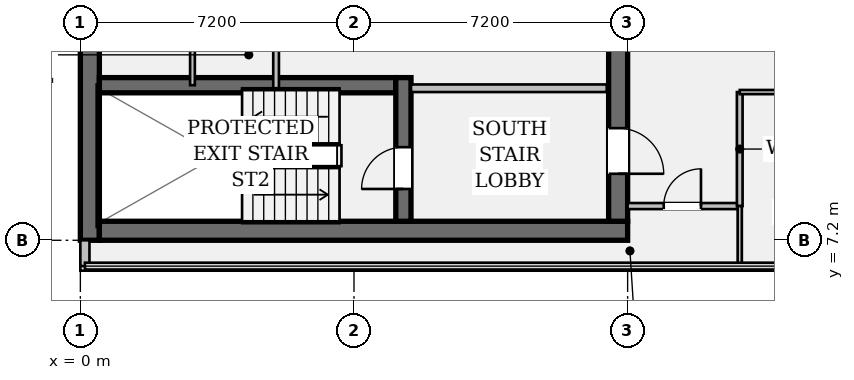
"""IFC4 building model, lengths in metres.
Left out: names, types, materials, properties, quantities, classifications, styles, units other than length and angle.
Written with IfcOpenShell. Run it as: python <this file> out.ifc"""

import sys

from ifc_helpers import new_model, si_unit, direction, frame, frame_2d, origin, place, context, subcontext, project, spatial, rectangle, extrude, element, fill, save


model = new_model("IFC4")
c1 = context("Model", 3, precision=1e-05, world=origin(), true_north=direction((0.0, 1.0)))
c2 = subcontext(c1, "Body", "Model", "MODEL_VIEW")
j1 = project(units=[si_unit("LENGTHUNIT", "METRE"), si_unit("PLANEANGLEUNIT", "RADIAN")], contexts=[c1])
p1 = place(None, origin())
s1 = spatial("IfcSite", under=j1, at=p1, CompositionType="ELEMENT")
p2 = place(p1, origin())
s2 = spatial("IfcBuilding", under=s1, at=p2, CompositionType="ELEMENT")
p3 = place(p2, frame((0.0, 0.0, 276.15)))
s3 = spatial("IfcBuildingStorey", under=s2, at=p3, CompositionType="ELEMENT", Elevation=276.15)
p4 = place(p3, frame((0.25, 7.2, 0.0), z_axis=(0.0, 0.0, 1.0), x_axis=(0.0, 1.0, 0.0)))
e1 = element("IfcWall", 1, at=p4, inside=s3, PredefinedType="SHEAR", context=c2, shape_type="SweptSolid", body=[
    extrude(rectangle(XDim=28.8, YDim=0.5, at=frame_2d((14.4, 0.0))), origin(), (0.0, 0.0, 1.0), 3.24),
])
p5 = place(p3, frame((0.5, 7.45, 0.0), z_axis=(0.0, 0.0, 1.0), x_axis=(1.0, 0.0, 0.0)))
e2 = element("IfcWall", 2, at=p5, inside=s3, PredefinedType="SHEAR", context=c2, shape_type="SweptSolid", body=[
    extrude(rectangle(XDim=13.9, YDim=0.5, at=frame_2d((6.95, 0.0))), origin(), (0.0, 0.0, 1.0), 3.24),
])
p6 = place(p3, frame((14.15, 35.5, 0.0), z_axis=(0.0, 0.0, 1.0), x_axis=(0.0, -1.0, 0.0)))
e3 = element("IfcWall", 3, at=p6, inside=s3, PredefinedType="SHEAR", context=c2, shape_type="SweptSolid", body=[
    extrude(rectangle(XDim=27.8, YDim=0.5, at=frame_2d((13.9, 0.0))), origin(), (0.0, 0.0, 1.0), 3.24),
])
p7 = place(p6, frame((1.4, 0.0, 0.0)))
e4 = element("IfcOpeningElement", 4, at=p7, cuts=e3, PredefinedType="OPENING", context=c2, shape_type="SweptSolid", body=[
    extrude(rectangle(XDim=1.2, YDim=2.15, at=frame_2d((0.6, 1.075))), frame((0.0, 0.262, 0.0), z_axis=(0.0, -1.0, 0.0), x_axis=(1.0, 0.0, 0.0)), (0.0, 0.0, 1.0), 0.524),
])
p8 = place(p6, frame((25.35, 0.0, 0.0)))
e5 = element("IfcOpeningElement", 5, at=p8, cuts=e3, PredefinedType="OPENING", context=c2, shape_type="SweptSolid", body=[
    extrude(rectangle(XDim=1.2, YDim=2.15, at=frame_2d((0.6, 1.075))), frame((0.0, 0.262, 0.0), z_axis=(0.0, -1.0, 0.0), x_axis=(1.0, 0.0, 0.0)), (0.0, 0.0, 1.0), 0.524),
])
p9 = place(p6, frame((14.7, 0.0, 0.0)))
e6 = element("IfcOpeningElement", 6, at=p9, cuts=e3, PredefinedType="OPENING", context=c2, shape_type="SweptSolid", body=[
    extrude(rectangle(XDim=1.6, YDim=2.2, at=frame_2d((0.8, 1.1))), frame((0.0, 0.262, 0.0), z_axis=(0.0, -1.0, 0.0), x_axis=(1.0, 0.0, 0.0)), (0.0, 0.0, 1.0), 0.524),
])
p10 = place(p3, frame((0.5, 11.28, 0.0), z_axis=(0.0, 0.0, 1.0), x_axis=(1.0, 0.0, 0.0)))
e7 = element("IfcWall", 7, at=p10, inside=s3, PredefinedType="SHEAR", context=c2, shape_type="SweptSolid", body=[
    extrude(rectangle(XDim=7.8, YDim=0.4, at=frame_2d((3.9, 0.0))), origin(), (0.0, 0.0, 1.0), 3.24),
])
p11 = place(p3, frame((8.5, 7.7, 0.0), z_axis=(0.0, 0.0, 1.0), x_axis=(0.0, 1.0, 0.0)))
e8 = element("IfcWall", 8, at=p11, inside=s3, PredefinedType="SHEAR", context=c2, shape_type="SweptSolid", body=[
    extrude(rectangle(XDim=3.78, YDim=0.4, at=frame_2d((1.89, 0.0))), origin(), (0.0, 0.0, 1.0), 3.24),
])
p12 = place(p11, frame((0.85, 0.0, 0.0)))
e9 = element("IfcOpeningElement", 9, at=p12, cuts=e8, PredefinedType="OPENING", context=c2, shape_type="SweptSolid", body=[
    extrude(rectangle(XDim=1.1, YDim=2.15, at=frame_2d((0.55, 1.075))), frame((0.0, 0.212, 0.0), z_axis=(0.0, -1.0, 0.0), x_axis=(1.0, 0.0, 0.0)), (0.0, 0.0, 1.0), 0.424),
])
p13 = place(p3, frame((0.12, 6.52, 0.0), z_axis=(0.0, 0.0, 1.0), x_axis=(0.0, 1.0, 0.0)))
e10 = element("IfcWall", 10, at=p13, inside=s3, PredefinedType="STANDARD", context=c2, shape_type="SweptSolid", body=[
    extrude(rectangle(XDim=0.68, YDim=0.24, at=frame_2d((0.34, 0.0))), origin(), (0.0, 0.0, 1.0), 3.24),
])
p14 = place(p3, frame((8.7, 11.2, 0.0), z_axis=(0.0, 0.0, 1.0), x_axis=(1.0, 0.0, 0.0)))
e11 = element("IfcWall", 11, at=p14, inside=s3, PredefinedType="PARTITIONING", context=c2, shape_type="SweptSolid", body=[
    extrude(rectangle(XDim=5.15, YDim=0.2, at=frame_2d((2.575, 0.0))), origin(), (0.0, 0.0, 1.0), 3.24),
])
p15 = place(p3, frame((5.15, 11.2, 0.0), z_axis=(0.0, 0.0, 1.0), x_axis=(0.0, 1.0, 0.0)))
e12 = element("IfcWall", 12, at=p15, inside=s3, PredefinedType="PARTITIONING", context=c2, shape_type="SweptSolid", body=[
    extrude(rectangle(XDim=6.6, YDim=0.15, at=frame_2d((3.3, 0.0))), origin(), (0.0, 0.0, 1.0), 3.24),
])
p16 = place(p3, frame((2.95, 11.28, 0.0), z_axis=(0.0, 0.0, 1.0), x_axis=(0.0, 1.0, 0.0)))
e13 = element("IfcWall", 13, at=p16, inside=s3, PredefinedType="PARTITIONING", context=c2, shape_type="SweptSolid", body=[
    extrude(rectangle(XDim=4.42, YDim=0.125, at=frame_2d((2.21, 0.0))), origin(), (0.0, 0.0, 1.0), 3.24),
])
p17 = place(p16, frame((1.6, 0.0, 0.0)))
e14 = element("IfcOpeningElement", 14, at=p17, cuts=e13, PredefinedType="OPENING", context=c2, shape_type="SweptSolid", body=[
    extrude(rectangle(XDim=0.85, YDim=2.15, at=frame_2d((0.425, 1.075))), frame((0.0, 0.074, 0.0), z_axis=(0.0, -1.0, 0.0), x_axis=(1.0, 0.0, 0.0)), (0.0, 0.0, 1.0), 0.149),
])
p18 = place(p3, frame((14.4, 8.1, 0.0), z_axis=(0.0, 0.0, 1.0), x_axis=(1.0, 0.0, 0.0)))
e15 = element("IfcWall", 15, at=p18, inside=s3, PredefinedType="PARTITIONING", context=c2, shape_type="SweptSolid", body=[
    extrude(rectangle(XDim=2.95, YDim=0.16, at=frame_2d((1.475, 0.0))), origin(), (0.0, 0.0, 1.0), 3.24),
])
p19 = place(p18, frame((0.95, 0.0, 0.0)))
e16 = element("IfcOpeningElement", 16, at=p19, cuts=e15, PredefinedType="OPENING", context=c2, shape_type="SweptSolid", body=[
    extrude(rectangle(XDim=0.98, YDim=2.15, at=frame_2d((0.49, 1.075))), frame((0.0, 0.092, 0.0), z_axis=(0.0, -1.0, 0.0), x_axis=(1.0, 0.0, 0.0)), (0.0, 0.0, 1.0), 0.184),
])
p20 = place(p3, frame((17.35, 8.1, 0.0), z_axis=(0.0, 0.0, 1.0), x_axis=(0.0, 1.0, 0.0)))
e17 = element("IfcWall", 17, at=p20, inside=s3, PredefinedType="PARTITIONING", context=c2, shape_type="SweptSolid", body=[
    extrude(rectangle(XDim=3.0, YDim=0.15, at=frame_2d((1.5, 0.0))), origin(), (0.0, 0.0, 1.0), 3.24),
])
p21 = place(p3, frame((17.35, 11.1, 0.0), z_axis=(0.0, 0.0, 1.0), x_axis=(1.0, 0.0, 0.0)))
e18 = element("IfcWall", 18, at=p21, inside=s3, PredefinedType="PARTITIONING", context=c2, shape_type="SweptSolid", body=[
    extrude(rectangle(XDim=11.4, YDim=0.11, at=frame_2d((5.7, 0.0))), origin(), (0.0, 0.0, 1.0), 2.676),
])
p22 = place(p21, frame((3.73, 0.0, 0.0)))
e19 = element("IfcOpeningElement", 19, at=p22, cuts=e18, PredefinedType="OPENING", context=c2, shape_type="SweptSolid", body=[
    extrude(rectangle(XDim=0.98, YDim=2.15, at=frame_2d((0.49, 1.075))), frame((0.0, 0.067, 0.0), z_axis=(0.0, -1.0, 0.0), x_axis=(1.0, 0.0, 0.0)), (0.0, 0.0, 1.0), 0.134),
])
p23 = place(p21, frame((9.42, 0.0, 0.0)))
e20 = element("IfcOpeningElement", 20, at=p23, cuts=e18, PredefinedType="OPENING", context=c2, shape_type="SweptSolid", body=[
    extrude(rectangle(XDim=0.98, YDim=2.15, at=frame_2d((0.49, 1.075))), frame((0.0, 0.067, 0.0), z_axis=(0.0, -1.0, 0.0), x_axis=(1.0, 0.0, 0.0)), (0.0, 0.0, 1.0), 0.134),
])
p24 = place(p3, frame((17.35, 6.52, 0.0), z_axis=(0.0, 0.0, 1.0), x_axis=(0.0, 1.0, 0.0)))
e21 = element("IfcWall", 21, at=p24, inside=s3, PredefinedType="PARTITIONING", context=c2, shape_type="SweptSolid", body=[
    extrude(rectangle(XDim=1.58, YDim=0.11, at=frame_2d((0.79, 0.0))), origin(), (0.0, 0.0, 1.0), 3.24),
])
p25 = place(p12, origin())
e22 = element("IfcDoor", 22, at=p25, inside=s3, OperationType="SINGLE_SWING_LEFT", PredefinedType="DOOR", context=c2, shape_type="SweptSolid", body=[
    extrude(rectangle(XDim=1.1, YDim=2.15, at=frame_2d((0.55, 1.075))), frame((0.0, 0.025, 0.0), z_axis=(0.0, -1.0, 0.0), x_axis=(1.0, 0.0, 0.0)), (0.0, 0.0, 1.0), 0.05),
])
fill(e9, e22)
p26 = place(p8, origin())
e23 = element("IfcDoor", 23, at=p26, inside=s3, OperationType="SINGLE_SWING_RIGHT", PredefinedType="DOOR", context=c2, shape_type="SweptSolid", body=[
    extrude(rectangle(XDim=1.2, YDim=2.15, at=frame_2d((0.6, 1.075))), frame((0.0, 0.025, 0.0), z_axis=(0.0, -1.0, 0.0), x_axis=(1.0, 0.0, 0.0)), (0.0, 0.0, 1.0), 0.05),
])
fill(e5, e23)
p27 = place(p19, origin())
e24 = element("IfcDoor", 24, at=p27, inside=s3, OperationType="SINGLE_SWING_RIGHT", PredefinedType="DOOR", context=c2, shape_type="SweptSolid", body=[
    extrude(rectangle(XDim=0.98, YDim=2.15, at=frame_2d((0.49, 1.075))), frame((0.0, 0.025, 0.0), z_axis=(0.0, -1.0, 0.0), x_axis=(1.0, 0.0, 0.0)), (0.0, 0.0, 1.0), 0.05),
])
fill(e16, e24)
save(model, sys.argv[1])
